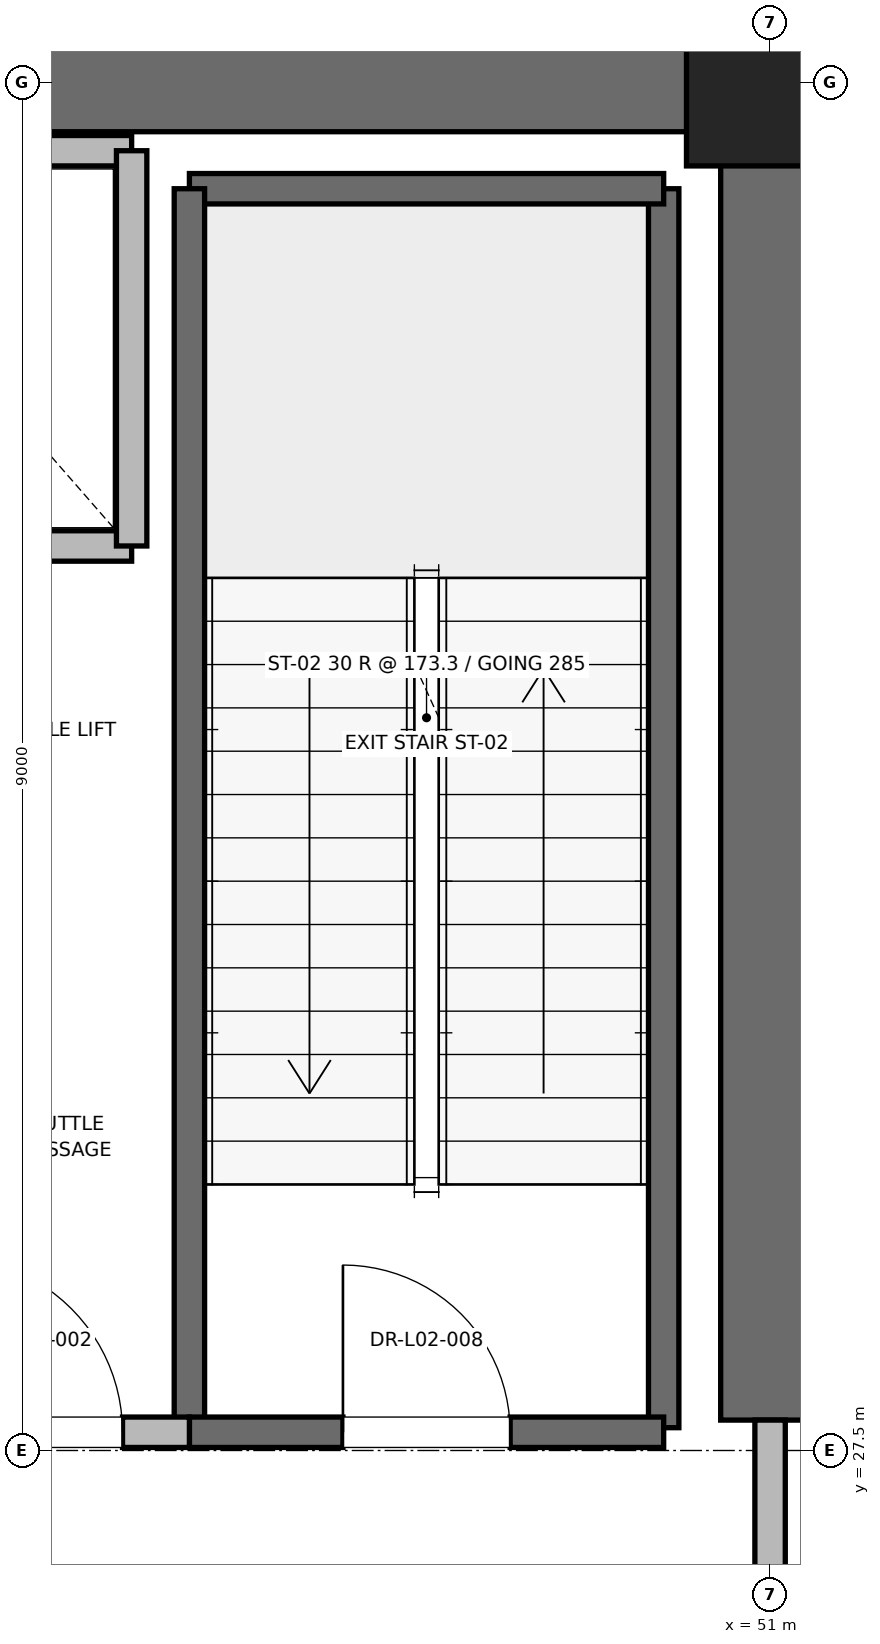
"""IFC4 building model, lengths in metres.
Left out: names, types, materials, properties, quantities, classifications, styles, units other than length and angle.
Written with IfcOpenShell. Run it as: python <this file> out.ifc"""

import sys

from ifc_helpers import new_model, si_unit, direction, frame, frame_2d, origin, origin_2d, place, context, subcontext, project, spatial, rectangle, extrude, element, fill, save


model = new_model("IFC4")
c1 = context("Model", 3, precision=1e-05, world=origin(), true_north=direction((0.0, 1.0)))
c2 = subcontext(c1, "Body", "Model", "MODEL_VIEW")
j1 = project(units=[si_unit("LENGTHUNIT", "METRE"), si_unit("PLANEANGLEUNIT", "RADIAN")], contexts=[c1])
p1 = place(None, origin())
s1 = spatial("IfcSite", under=j1, at=p1, CompositionType="ELEMENT")
p2 = place(p1, origin())
s2 = spatial("IfcBuilding", under=s1, at=p2, CompositionType="ELEMENT")
p3 = place(p2, frame((0.0, 0.0, 11.2)))
s3 = spatial("IfcBuildingStorey", under=s2, at=p3, CompositionType="ELEMENT", Elevation=11.2)
p4 = place(p3, frame((51.0, 36.5, 0.0), z_axis=(0.0, 0.0, 1.0), x_axis=(1.0, 0.0, 0.0)))
e1 = element("IfcColumn", 1, at=p4, inside=s3, PredefinedType="PILASTER", context=c2, shape_type="SweptSolid", body=[
    extrude(rectangle(XDim=1.1, YDim=1.1, at=origin_2d()), origin(), (0.0, 0.0, 1.0), 5.2),
])
p5 = place(p3, frame((45.2, 36.5, 0.0), z_axis=(0.0, 0.0, 1.0), x_axis=(1.0, 0.0, 0.0)))
e2 = element("IfcWall", 2, at=p5, inside=s3, PredefinedType="SHEAR", context=c2, shape_type="SweptSolid", body=[
    extrude(rectangle(XDim=5.8, YDim=0.65, at=frame_2d((2.9, 0.0))), origin(), (0.0, 0.0, 1.0), 4.92),
])
p6 = place(p3, frame((51.0, 27.7, 0.0), z_axis=(0.0, 0.0, 1.0), x_axis=(0.0, 1.0, 0.0)))
e3 = element("IfcWall", 3, at=p6, inside=s3, PredefinedType="SHEAR", context=c2, shape_type="SweptSolid", body=[
    extrude(rectangle(XDim=8.8, YDim=0.65, at=frame_2d((4.4, 0.0))), origin(), (0.0, 0.0, 1.0), 4.92),
])
p7 = place(p3, frame((50.3, 27.65, 0.0), z_axis=(0.0, 0.0, 1.0), x_axis=(0.0, 1.0, 0.0)))
e4 = element("IfcWall", 4, at=p7, inside=s3, PredefinedType="SOLIDWALL", context=c2, shape_type="SweptSolid", body=[
    extrude(rectangle(XDim=8.15, YDim=0.2, at=frame_2d((4.075, 0.0))), origin(), (0.0, 0.0, 1.0), 4.92),
])
p8 = place(p3, frame((47.18, 35.8, 0.0), z_axis=(0.0, 0.0, 1.0), x_axis=(1.0, 0.0, 0.0)))
e5 = element("IfcWall", 5, at=p8, inside=s3, PredefinedType="SOLIDWALL", context=c2, shape_type="SweptSolid", body=[
    extrude(rectangle(XDim=3.12, YDim=0.2, at=frame_2d((1.56, 0.0))), origin(), (0.0, 0.0, 1.0), 4.92),
])
p9 = place(p3, frame((47.18, 27.62, 0.0), z_axis=(0.0, 0.0, 1.0), x_axis=(0.0, 1.0, 0.0)))
e6 = element("IfcWall", 6, at=p9, inside=s3, PredefinedType="SOLIDWALL", context=c2, shape_type="SweptSolid", body=[
    extrude(rectangle(XDim=8.18, YDim=0.2, at=frame_2d((4.09, 0.0))), origin(), (0.0, 0.0, 1.0), 4.92),
])
p10 = place(p3, frame((47.18, 27.62, 0.0), z_axis=(0.0, 0.0, 1.0), x_axis=(1.0, 0.0, 0.0)))
e7 = element("IfcWall", 7, at=p10, inside=s3, PredefinedType="SOLIDWALL", context=c2, shape_type="SweptSolid", body=[
    extrude(rectangle(XDim=3.12, YDim=0.2, at=frame_2d((1.56, 0.0))), origin(), (0.0, 0.0, 1.0), 4.92),
])
p11 = place(p10, frame((1.01, 0.0, 0.0)))
e8 = element("IfcOpeningElement", 8, at=p11, cuts=e7, PredefinedType="OPENING", context=c2, shape_type="SweptSolid", body=[
    extrude(rectangle(XDim=1.1, YDim=2.15, at=frame_2d((0.55, 1.075))), frame((0.0, 0.1, 0.0), z_axis=(0.0, -1.0, 0.0), x_axis=(1.0, 0.0, 0.0)), (0.0, 0.0, 1.0), 0.2),
])
p12 = place(p3, frame((45.15, 27.62, 0.0), z_axis=(0.0, 0.0, 1.0), x_axis=(1.0, 0.0, 0.0)))
e9 = element("IfcWall", 9, at=p12, inside=s3, PredefinedType="PARTITIONING", context=c2, shape_type="SweptSolid", body=[
    extrude(rectangle(XDim=2.03, YDim=0.2, at=frame_2d((1.015, 0.0))), origin(), (0.0, 0.0, 1.0), 4.92),
])
p13 = place(p12, frame((0.44, 0.0, 0.0)))
e10 = element("IfcOpeningElement", 10, at=p13, cuts=e9, PredefinedType="OPENING", context=c2, shape_type="SweptSolid", body=[
    extrude(rectangle(XDim=1.15, YDim=2.2, at=frame_2d((0.575, 1.1))), frame((0.0, 0.1, 0.0), z_axis=(0.0, -1.0, 0.0), x_axis=(1.0, 0.0, 0.0)), (0.0, 0.0, 1.0), 0.2),
])
p14 = place(p3, frame((51.0, 24.3, 0.0), z_axis=(0.0, 0.0, 1.0), x_axis=(0.0, 1.0, 0.0)))
e11 = element("IfcWall", 11, at=p14, inside=s3, PredefinedType="PARTITIONING", context=c2, shape_type="SweptSolid", body=[
    extrude(rectangle(XDim=3.4, YDim=0.2, at=frame_2d((1.7, 0.0))), origin(), (0.0, 0.0, 1.0), 3.7),
])
p15 = place(p14, frame((1.125, 0.0, 0.0)))
e12 = element("IfcOpeningElement", 12, at=p15, cuts=e11, PredefinedType="OPENING", context=c2, shape_type="SweptSolid", body=[
    extrude(rectangle(XDim=1.15, YDim=2.2, at=frame_2d((0.575, 1.1))), frame((0.0, 0.1, 0.0), z_axis=(0.0, -1.0, 0.0), x_axis=(1.0, 0.0, 0.0)), (0.0, 0.0, 1.0), 0.2),
])
p16 = place(p3, frame((44.5, 33.45, 0.0), z_axis=(0.0, 0.0, 1.0), x_axis=(1.0, 0.0, 0.0)))
e13 = element("IfcWall", 13, at=p16, inside=s3, PredefinedType="SOLIDWALL", context=c2, shape_type="SweptSolid", body=[
    extrude(rectangle(XDim=2.3, YDim=0.2, at=frame_2d((1.15, 0.0))), origin(), (0.0, 0.0, 1.0), 4.92),
])
p17 = place(p3, frame((46.8, 36.05, 0.0), z_axis=(0.0, 0.0, 1.0), x_axis=(-1.0, 0.0, 0.0)))
e14 = element("IfcWall", 14, at=p17, inside=s3, PredefinedType="SOLIDWALL", context=c2, shape_type="SweptSolid", body=[
    extrude(rectangle(XDim=2.3, YDim=0.2, at=frame_2d((1.15, 0.0))), origin(), (0.0, 0.0, 1.0), 3.7),
])
p18 = place(p3, frame((46.8, 33.45, 0.0), z_axis=(0.0, 0.0, 1.0), x_axis=(0.0, 1.0, 0.0)))
e15 = element("IfcWall", 15, at=p18, inside=s3, PredefinedType="SOLIDWALL", context=c2, shape_type="SweptSolid", body=[
    extrude(rectangle(XDim=2.6, YDim=0.2, at=frame_2d((1.3, 0.0))), origin(), (0.0, 0.0, 1.0), 4.92),
])
p19 = place(p11, origin())
e16 = element("IfcDoor", 16, at=p19, inside=s3, OperationType="SINGLE_SWING_LEFT", PredefinedType="DOOR", context=c2, shape_type="SweptSolid", body=[
    extrude(rectangle(XDim=1.1, YDim=2.15, at=frame_2d((0.55, 1.075))), frame((0.0, 0.025, 0.0), z_axis=(0.0, -1.0, 0.0), x_axis=(1.0, 0.0, 0.0)), (0.0, 0.0, 1.0), 0.05),
])
fill(e8, e16)
p20 = place(p13, origin())
e17 = element("IfcDoor", 17, at=p20, inside=s3, OperationType="SINGLE_SWING_LEFT", PredefinedType="DOOR", context=c2, shape_type="SweptSolid", body=[
    extrude(rectangle(XDim=1.15, YDim=2.2, at=frame_2d((0.575, 1.1))), frame((0.0, 0.025, 0.0), z_axis=(0.0, -1.0, 0.0), x_axis=(1.0, 0.0, 0.0)), (0.0, 0.0, 1.0), 0.05),
])
fill(e10, e17)
save(model, sys.argv[1])
